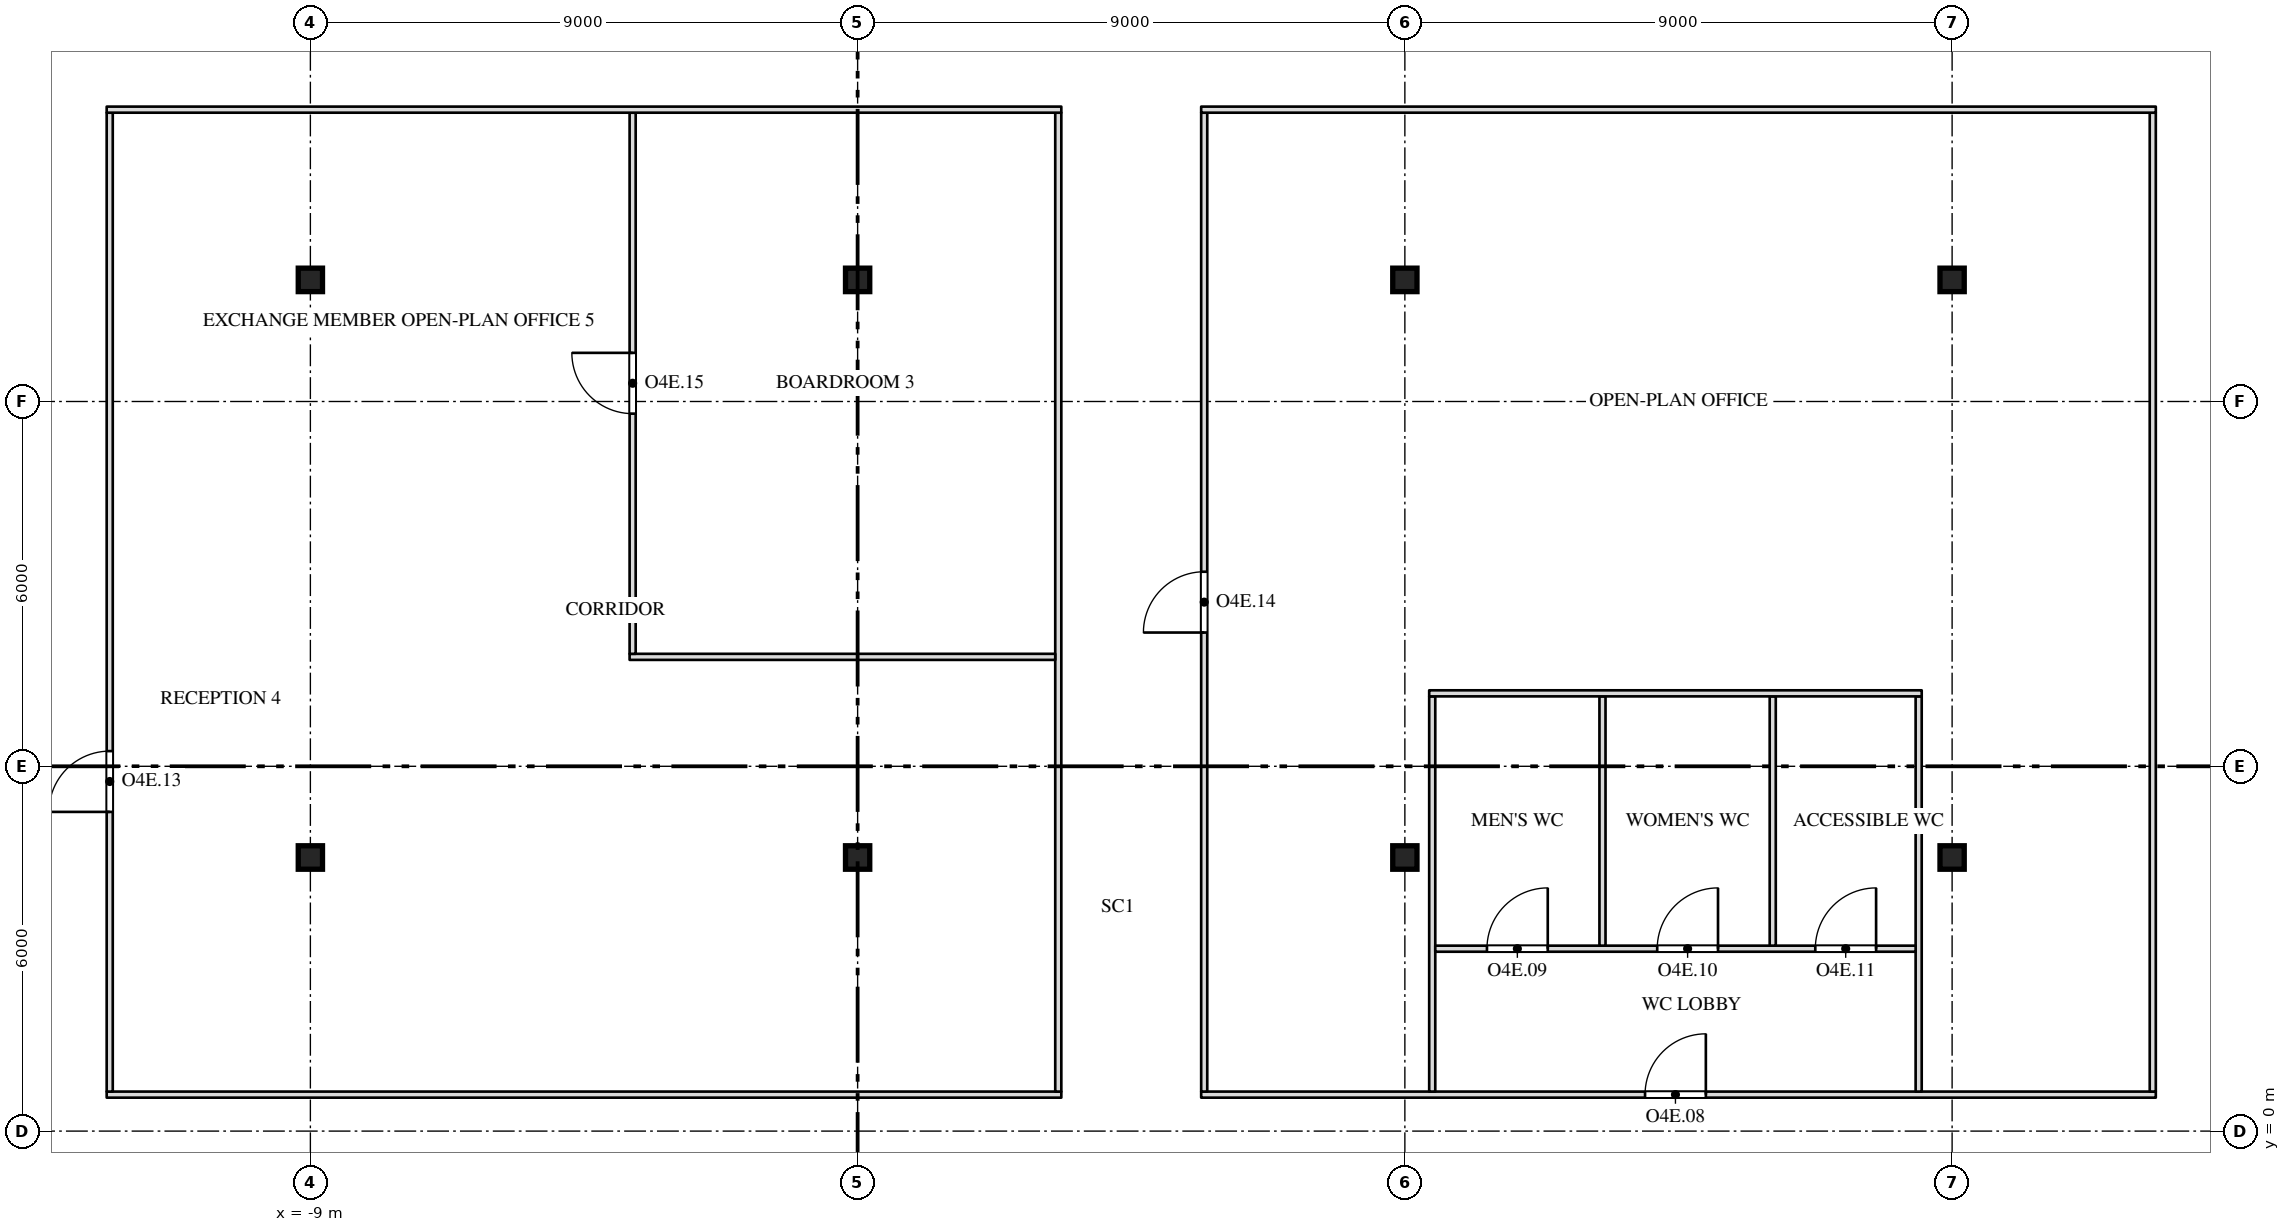
"""IFC4 building model, lengths in metres.
Left out: names, types, materials, properties, quantities, classifications, styles, units other than length and angle.
Written with IfcOpenShell. Run it as: python <this file> out.ifc"""

import sys

from ifc_helpers import new_model, si_unit, direction, frame, frame_2d, origin, origin_2d, place, context, subcontext, project, spatial, rectangle, i_section, extrude, element, fill, save


model = new_model("IFC4")
c1 = context("Model", 3, precision=1e-05, world=origin(), true_north=direction((0.0, 1.0)))
c2 = subcontext(c1, "Body", "Model", "MODEL_VIEW")
j1 = project(units=[si_unit("LENGTHUNIT", "METRE"), si_unit("PLANEANGLEUNIT", "RADIAN")], contexts=[c1])
p1 = place(None, origin())
s1 = spatial("IfcSite", under=j1, at=p1, CompositionType="ELEMENT")
p2 = place(p1, origin())
s2 = spatial("IfcBuilding", under=s1, at=p2, CompositionType="ELEMENT")
p3 = place(p2, frame((0.0, 0.0, 256.5)))
s3 = spatial("IfcBuildingStorey", under=s2, at=p3, CompositionType="ELEMENT", Elevation=256.5)
for number, where, z_axis, x_axis in (
    (1, (-9.0, 4.5, 0.0), (0.0, 0.0, 1.0), (1.0, 0.0, 0.0)),
    (2, (0.0, 4.5, 0.0), (0.0, 0.0, 1.0), (1.0, 0.0, 0.0)),
    (3, (9.0, 4.5, 0.0), (0.0, 0.0, 1.0), (1.0, 0.0, 0.0)),
    (4, (18.0, 4.5, 0.0), (0.0, 0.0, 1.0), (1.0, 0.0, 0.0)),
    (5, (-9.0, 14.0, 0.0), (0.0, 0.0, 1.0), (1.0, 0.0, 0.0)),
    (6, (0.0, 14.0, 0.0), (0.0, 0.0, 1.0), (1.0, 0.0, 0.0)),
    (7, (9.0, 14.0, 0.0), (0.0, 0.0, 1.0), (1.0, 0.0, 0.0)),
    (8, (18.0, 14.0, 0.0), (0.0, 0.0, 1.0), (1.0, 0.0, 0.0)),
):
    element("IfcColumn", number, at=place(p3, frame(where, z_axis=z_axis, x_axis=x_axis)), inside=s3, PredefinedType="COLUMN", context=c2, shape_type="SweptSolid", body=[
        extrude(i_section(OverallWidth=0.399, OverallDepth=0.386, WebThickness=0.021, FlangeThickness=0.033, at=origin_2d()), origin(), (0.0, 0.0, 1.0), 4.0),
    ])
p4 = place(p3, frame((-12.35, 0.6, 0.0), z_axis=(0.0, 0.0, 1.0), x_axis=(1.0, 0.0, 0.0)))
e9 = element("IfcWall", 9, at=p4, inside=s3, PredefinedType="PARTITIONING", context=c2, shape_type="SweptSolid", body=[
    extrude(rectangle(XDim=15.7, YDim=0.1, at=frame_2d((7.85, 0.0))), origin(), (0.0, 0.0, 1.0), 3.8),
])
p5 = place(p3, frame((-12.3, 0.65, 0.0), z_axis=(0.0, 0.0, 1.0), x_axis=(0.0, 1.0, 0.0)))
e10 = element("IfcWall", 10, at=p5, inside=s3, PredefinedType="PARTITIONING", context=c2, shape_type="SweptSolid", body=[
    extrude(rectangle(XDim=16.1, YDim=0.1, at=frame_2d((8.05, 0.0))), origin(), (0.0, 0.0, 1.0), 3.8),
])
p6 = place(p5, frame((4.6, 0.0, 0.0)))
e11 = element("IfcOpeningElement", 11, at=p6, cuts=e10, PredefinedType="OPENING", context=c2, shape_type="SweptSolid", body=[
    extrude(rectangle(XDim=1.0, YDim=2.1, at=frame_2d((0.5, 1.05))), frame((0.0, 0.062, 0.0), z_axis=(0.0, -1.0, 0.0), x_axis=(1.0, 0.0, 0.0)), (0.0, 0.0, 1.0), 0.124),
])
p7 = place(p3, frame((3.3, 0.65, 0.0), z_axis=(0.0, 0.0, 1.0), x_axis=(0.0, 1.0, 0.0)))
e12 = element("IfcWall", 12, at=p7, inside=s3, PredefinedType="PARTITIONING", context=c2, shape_type="SweptSolid", body=[
    extrude(rectangle(XDim=16.1, YDim=0.1, at=frame_2d((8.05, 0.0))), origin(), (0.0, 0.0, 1.0), 3.8),
])
p8 = place(p3, frame((5.65, 0.6, 0.0), z_axis=(0.0, 0.0, 1.0), x_axis=(1.0, 0.0, 0.0)))
e13 = element("IfcWall", 13, at=p8, inside=s3, PredefinedType="PARTITIONING", context=c2, shape_type="SweptSolid", body=[
    extrude(rectangle(XDim=15.7, YDim=0.1, at=frame_2d((7.85, 0.0))), origin(), (0.0, 0.0, 1.0), 3.8),
])
p9 = place(p8, frame((7.3, 0.0, 0.0)))
e14 = element("IfcOpeningElement", 14, at=p9, cuts=e13, PredefinedType="OPENING", context=c2, shape_type="SweptSolid", body=[
    extrude(rectangle(XDim=1.0, YDim=2.1, at=frame_2d((0.5, 1.05))), frame((0.0, 0.062, 0.0), z_axis=(0.0, -1.0, 0.0), x_axis=(1.0, 0.0, 0.0)), (0.0, 0.0, 1.0), 0.124),
])
p10 = place(p3, frame((5.7, 0.65, 0.0), z_axis=(0.0, 0.0, 1.0), x_axis=(0.0, 1.0, 0.0)))
e15 = element("IfcWall", 15, at=p10, inside=s3, PredefinedType="PARTITIONING", context=c2, shape_type="SweptSolid", body=[
    extrude(rectangle(XDim=16.1, YDim=0.1, at=frame_2d((8.05, 0.0))), origin(), (0.0, 0.0, 1.0), 3.8),
])
p11 = place(p10, frame((7.55, 0.0, 0.0)))
e16 = element("IfcOpeningElement", 16, at=p11, cuts=e15, PredefinedType="OPENING", context=c2, shape_type="SweptSolid", body=[
    extrude(rectangle(XDim=1.0, YDim=2.1, at=frame_2d((0.5, 1.05))), frame((0.0, 0.062, 0.0), z_axis=(0.0, -1.0, 0.0), x_axis=(1.0, 0.0, 0.0)), (0.0, 0.0, 1.0), 0.124),
])
for number, where, z_axis, x_axis in (
    (17, (9.45, 0.65, 0.0), (0.0, 0.0, 1.0), (0.0, 1.0, 0.0)),
    (18, (17.45, 0.65, 0.0), (0.0, 0.0, 1.0), (0.0, 1.0, 0.0)),
):
    element("IfcWall", number, at=place(p3, frame(where, z_axis=z_axis, x_axis=x_axis)), inside=s3, PredefinedType="PARTITIONING", context=c2, shape_type="SweptSolid", body=[
        extrude(rectangle(XDim=6.5, YDim=0.1, at=frame_2d((3.25, 0.0))), origin(), (0.0, 0.0, 1.0), 3.8),
    ])
p12 = place(p3, frame((21.3, 0.65, 0.0), z_axis=(0.0, 0.0, 1.0), x_axis=(0.0, 1.0, 0.0)))
e19 = element("IfcWall", 19, at=p12, inside=s3, PredefinedType="PARTITIONING", context=c2, shape_type="SweptSolid", body=[
    extrude(rectangle(XDim=16.1, YDim=0.1, at=frame_2d((8.05, 0.0))), origin(), (0.0, 0.0, 1.0), 3.8),
])
p13 = place(p3, frame((9.5, 3.0, 0.0), z_axis=(0.0, 0.0, 1.0), x_axis=(1.0, 0.0, 0.0)))
e20 = element("IfcWall", 20, at=p13, inside=s3, PredefinedType="PARTITIONING", context=c2, shape_type="SweptSolid", body=[
    extrude(rectangle(XDim=7.9, YDim=0.1, at=frame_2d((3.95, 0.0))), origin(), (0.0, 0.0, 1.0), 3.8),
])
p14 = place(p13, frame((0.85, 0.0, 0.0)))
e21 = element("IfcOpeningElement", 21, at=p14, cuts=e20, PredefinedType="OPENING", context=c2, shape_type="SweptSolid", body=[
    extrude(rectangle(XDim=1.0, YDim=2.1, at=frame_2d((0.5, 1.05))), frame((0.0, 0.062, 0.0), z_axis=(0.0, -1.0, 0.0), x_axis=(1.0, 0.0, 0.0)), (0.0, 0.0, 1.0), 0.124),
])
p15 = place(p13, frame((3.65, 0.0, 0.0)))
e22 = element("IfcOpeningElement", 22, at=p15, cuts=e20, PredefinedType="OPENING", context=c2, shape_type="SweptSolid", body=[
    extrude(rectangle(XDim=1.0, YDim=2.1, at=frame_2d((0.5, 1.05))), frame((0.0, 0.062, 0.0), z_axis=(0.0, -1.0, 0.0), x_axis=(1.0, 0.0, 0.0)), (0.0, 0.0, 1.0), 0.124),
])
p16 = place(p13, frame((6.25, 0.0, 0.0)))
e23 = element("IfcOpeningElement", 23, at=p16, cuts=e20, PredefinedType="OPENING", context=c2, shape_type="SweptSolid", body=[
    extrude(rectangle(XDim=1.0, YDim=2.1, at=frame_2d((0.5, 1.05))), frame((0.0, 0.062, 0.0), z_axis=(0.0, -1.0, 0.0), x_axis=(1.0, 0.0, 0.0)), (0.0, 0.0, 1.0), 0.124),
])
for number, where, z_axis, x_axis in (
    (24, (12.25, 3.05, 0.0), (0.0, 0.0, 1.0), (0.0, 1.0, 0.0)),
    (25, (15.05, 3.05, 0.0), (0.0, 0.0, 1.0), (0.0, 1.0, 0.0)),
):
    element("IfcWall", number, at=place(p3, frame(where, z_axis=z_axis, x_axis=x_axis)), inside=s3, PredefinedType="PARTITIONING", context=c2, shape_type="SweptSolid", body=[
        extrude(rectangle(XDim=4.1, YDim=0.1, at=frame_2d((2.05, 0.0))), origin(), (0.0, 0.0, 1.0), 3.8),
    ])
p17 = place(p3, frame((9.4, 7.2, 0.0), z_axis=(0.0, 0.0, 1.0), x_axis=(1.0, 0.0, 0.0)))
e26 = element("IfcWall", 26, at=p17, inside=s3, PredefinedType="PARTITIONING", context=c2, shape_type="SweptSolid", body=[
    extrude(rectangle(XDim=8.1, YDim=0.1, at=frame_2d((4.05, 0.0))), origin(), (0.0, 0.0, 1.0), 3.8),
])
p18 = place(p3, frame((-3.75, 7.8, 0.0), z_axis=(0.0, 0.0, 1.0), x_axis=(1.0, 0.0, 0.0)))
e27 = element("IfcWall", 27, at=p18, inside=s3, PredefinedType="PARTITIONING", context=c2, shape_type="SweptSolid", body=[
    extrude(rectangle(XDim=7.0, YDim=0.1, at=frame_2d((3.5, 0.0))), origin(), (0.0, 0.0, 1.0), 3.8),
])
p19 = place(p3, frame((-3.7, 7.85, 0.0), z_axis=(0.0, 0.0, 1.0), x_axis=(0.0, 1.0, 0.0)))
e28 = element("IfcWall", 28, at=p19, inside=s3, PredefinedType="PARTITIONING", context=c2, shape_type="SweptSolid", body=[
    extrude(rectangle(XDim=8.9, YDim=0.1, at=frame_2d((4.45, 0.0))), origin(), (0.0, 0.0, 1.0), 3.8),
])
p20 = place(p19, frame((3.95, 0.0, 0.0)))
e29 = element("IfcOpeningElement", 29, at=p20, cuts=e28, PredefinedType="OPENING", context=c2, shape_type="SweptSolid", body=[
    extrude(rectangle(XDim=1.0, YDim=2.1, at=frame_2d((0.5, 1.05))), frame((0.0, 0.062, 0.0), z_axis=(0.0, -1.0, 0.0), x_axis=(1.0, 0.0, 0.0)), (0.0, 0.0, 1.0), 0.124),
])
for number, where, z_axis, x_axis in (
    (30, (-12.35, 16.8, 0.0), (0.0, 0.0, 1.0), (1.0, 0.0, 0.0)),
    (31, (5.65, 16.8, 0.0), (0.0, 0.0, 1.0), (1.0, 0.0, 0.0)),
):
    element("IfcWall", number, at=place(p3, frame(where, z_axis=z_axis, x_axis=x_axis)), inside=s3, PredefinedType="PARTITIONING", context=c2, shape_type="SweptSolid", body=[
        extrude(rectangle(XDim=15.7, YDim=0.1, at=frame_2d((7.85, 0.0))), origin(), (0.0, 0.0, 1.0), 3.8),
    ])
p21 = place(p9, origin())
e32 = element("IfcDoor", 32, at=p21, inside=s3, OperationType="SINGLE_SWING_RIGHT", PredefinedType="DOOR", context=c2, shape_type="SweptSolid", body=[
    extrude(rectangle(XDim=1.0, YDim=2.1, at=frame_2d((0.5, 1.05))), frame((0.0, 0.025, 0.0), z_axis=(0.0, -1.0, 0.0), x_axis=(1.0, 0.0, 0.0)), (0.0, 0.0, 1.0), 0.05),
])
fill(e14, e32)
p22 = place(p14, origin())
e33 = element("IfcDoor", 33, at=p22, inside=s3, OperationType="SINGLE_SWING_RIGHT", PredefinedType="DOOR", context=c2, shape_type="SweptSolid", body=[
    extrude(rectangle(XDim=1.0, YDim=2.1, at=frame_2d((0.5, 1.05))), frame((0.0, 0.025, 0.0), z_axis=(0.0, -1.0, 0.0), x_axis=(1.0, 0.0, 0.0)), (0.0, 0.0, 1.0), 0.05),
])
fill(e21, e33)
p23 = place(p15, origin())
e34 = element("IfcDoor", 34, at=p23, inside=s3, OperationType="SINGLE_SWING_RIGHT", PredefinedType="DOOR", context=c2, shape_type="SweptSolid", body=[
    extrude(rectangle(XDim=1.0, YDim=2.1, at=frame_2d((0.5, 1.05))), frame((0.0, 0.025, 0.0), z_axis=(0.0, -1.0, 0.0), x_axis=(1.0, 0.0, 0.0)), (0.0, 0.0, 1.0), 0.05),
])
fill(e22, e34)
p24 = place(p16, origin())
e35 = element("IfcDoor", 35, at=p24, inside=s3, OperationType="SINGLE_SWING_RIGHT", PredefinedType="DOOR", context=c2, shape_type="SweptSolid", body=[
    extrude(rectangle(XDim=1.0, YDim=2.1, at=frame_2d((0.5, 1.05))), frame((0.0, 0.025, 0.0), z_axis=(0.0, -1.0, 0.0), x_axis=(1.0, 0.0, 0.0)), (0.0, 0.0, 1.0), 0.05),
])
fill(e23, e35)
p25 = place(p6, origin())
e36 = element("IfcDoor", 36, at=p25, inside=s3, OperationType="SINGLE_SWING_LEFT", PredefinedType="DOOR", context=c2, shape_type="SweptSolid", body=[
    extrude(rectangle(XDim=1.0, YDim=2.1, at=frame_2d((0.5, 1.05))), frame((0.0, 0.025, 0.0), z_axis=(0.0, -1.0, 0.0), x_axis=(1.0, 0.0, 0.0)), (0.0, 0.0, 1.0), 0.05),
])
fill(e11, e36)
p26 = place(p11, origin())
e37 = element("IfcDoor", 37, at=p26, inside=s3, OperationType="SINGLE_SWING_LEFT", PredefinedType="DOOR", context=c2, shape_type="SweptSolid", body=[
    extrude(rectangle(XDim=1.0, YDim=2.1, at=frame_2d((0.5, 1.05))), frame((0.0, 0.025, 0.0), z_axis=(0.0, -1.0, 0.0), x_axis=(1.0, 0.0, 0.0)), (0.0, 0.0, 1.0), 0.05),
])
fill(e16, e37)
p27 = place(p20, origin())
e38 = element("IfcDoor", 38, at=p27, inside=s3, OperationType="SINGLE_SWING_RIGHT", PredefinedType="DOOR", context=c2, shape_type="SweptSolid", body=[
    extrude(rectangle(XDim=1.0, YDim=2.1, at=frame_2d((0.5, 1.05))), frame((0.0, 0.025, 0.0), z_axis=(0.0, -1.0, 0.0), x_axis=(1.0, 0.0, 0.0)), (0.0, 0.0, 1.0), 0.05),
])
fill(e29, e38)
save(model, sys.argv[1])
